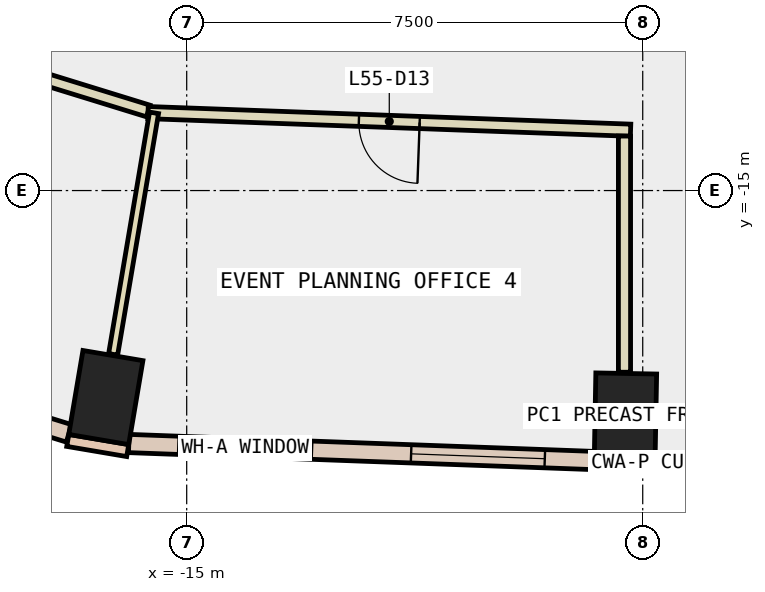
"""IFC4 building model, lengths in metres.
Left out: names, types, materials, properties, quantities, classifications, styles, units other than length and angle.
Written with IfcOpenShell. Run it as: python <this file> out.ifc"""

import sys

from ifc_helpers import new_model, si_unit, direction, frame, frame_2d, origin, origin_2d, place, context, subcontext, project, spatial, rectangle, extrude, element, fill, save


model = new_model("IFC4")
c1 = context("Model", 3, precision=1e-05, world=origin(), true_north=direction((0.0, 1.0)))
c2 = subcontext(c1, "Body", "Model", "MODEL_VIEW")
j1 = project(units=[si_unit("LENGTHUNIT", "METRE"), si_unit("PLANEANGLEUNIT", "RADIAN")], contexts=[c1])
p1 = place(None, origin())
s1 = spatial("IfcSite", under=j1, at=p1, CompositionType="ELEMENT")
p2 = place(p1, origin())
s2 = spatial("IfcBuilding", under=s1, at=p2, CompositionType="ELEMENT")
p3 = place(p2, frame((0.0, 0.0, 245.0)))
s3 = spatial("IfcBuildingStorey", under=s2, at=p3, CompositionType="ELEMENT", Elevation=245.0)
for number, where, z_axis, x_axis in (
    (1, (-16.33, -18.404, -0.34), (0.0, 0.0, 1.0), (-0.986, 0.167, 0.0)),
    (2, (-7.784, -18.708, -0.34), (0.0, 0.0, 1.0), (-1.0, 0.018, 0.0)),
):
    element("IfcColumn", number, at=place(p3, frame(where, z_axis=z_axis, x_axis=x_axis)), inside=s3, PredefinedType="COLUMN", context=c2, shape_type="SweptSolid", body=[
        extrude(rectangle(XDim=1.0, YDim=1.4, at=origin_2d()), origin(), (0.0, 0.0, 1.0), 3.6),
    ])
for number, where, z_axis, x_axis in (
    (3, (-16.956, -19.109, 0.0), (0.0, 0.0, 1.0), (0.986, -0.167, 0.0)),
    (4, (-8.298, -19.499, 0.0), (0.0, 0.0, 1.0), (1.0, -0.018, 0.0)),
):
    element("IfcWall", number, at=place(p3, frame(where, z_axis=z_axis, x_axis=x_axis)), inside=s3, PredefinedType="STANDARD", context=c2, shape_type="SweptSolid", body=[
        extrude(rectangle(XDim=1.0, YDim=0.2, at=frame_2d((0.5, 0.0))), origin(), (0.0, 0.0, 1.0), 3.26),
    ])
p4 = place(p3, frame((-15.952, -19.16, 0.0), z_axis=(0.0, 0.0, 1.0), x_axis=(0.999331753125, -0.036551979363, 0.0)))
e5 = element("IfcWall", 5, at=p4, inside=s3, PredefinedType="STANDARD", context=c2, shape_type="SweptSolid", body=[
    extrude(rectangle(XDim=7.661, YDim=0.3, at=frame_2d((3.831, 0.0))), origin(), (0.0, 0.0, 1.0), 3.26),
])
p5 = place(p4, frame((0.815, 0.0, 0.9)))
e6 = element("IfcOpeningElement", 6, at=p5, cuts=e5, PredefinedType="OPENING", context=c2, shape_type="SweptSolid", body=[
    extrude(rectangle(XDim=2.2, YDim=2.0, at=frame_2d((1.1, 1.0))), frame((0.0, 0.16, 0.0), z_axis=(0.0, -1.0, 0.0), x_axis=(1.0, 0.0, 0.0)), (0.0, 0.0, 1.0), 0.32),
])
p6 = place(p4, frame((4.646, 0.0, 0.9)))
e7 = element("IfcOpeningElement", 7, at=p6, cuts=e5, PredefinedType="OPENING", context=c2, shape_type="SweptSolid", body=[
    extrude(rectangle(XDim=2.2, YDim=2.0, at=frame_2d((1.1, 1.0))), frame((0.0, 0.16, 0.0), z_axis=(0.0, -1.0, 0.0), x_axis=(1.0, 0.0, 0.0)), (0.0, 0.0, 1.0), 0.32),
])
p7 = place(p3, frame((-20.661, -17.845, 0.0), z_axis=(0.0, 0.0, 1.0), x_axis=(0.955646189569, -0.2945171648, 0.0)))
e8 = element("IfcWall", 8, at=p7, inside=s3, PredefinedType="STANDARD", context=c2, shape_type="SweptSolid", body=[
    extrude(rectangle(XDim=3.898, YDim=0.3, at=frame_2d((1.949, 0.0))), origin(), (0.0, 0.0, 1.0), 3.26),
])
p8 = place(p7, frame((1.249, 0.0, 0.9)))
e9 = element("IfcOpeningElement", 9, at=p8, cuts=e8, PredefinedType="OPENING", context=c2, shape_type="SweptSolid", body=[
    extrude(rectangle(XDim=1.4, YDim=2.0, at=frame_2d((0.7, 1.0))), frame((0.0, 0.16, 0.0), z_axis=(0.0, -1.0, 0.0), x_axis=(1.0, 0.0, 0.0)), (0.0, 0.0, 1.0), 0.32),
])
p9 = place(p3, frame((-15.632, -13.692, 0.0), z_axis=(0.0, 0.0, 1.0), x_axis=(-0.955600342663, 0.294665887239, 0.0)))
e10 = element("IfcWall", 10, at=p9, inside=s3, PredefinedType="PARTITIONING", context=c2, shape_type="SweptSolid", body=[
    extrude(rectangle(XDim=2.81, YDim=0.2, at=frame_2d((1.405, 0.0))), origin(), (0.0, 0.0, 1.0), 3.26),
])
p10 = place(p3, frame((-7.7, -14.008, 0.0), z_axis=(0.0, 0.0, 1.0), x_axis=(-0.99933282306, 0.036522715615, 0.0)))
e11 = element("IfcWall", 11, at=p10, inside=s3, PredefinedType="PARTITIONING", context=c2, shape_type="SweptSolid", body=[
    extrude(rectangle(XDim=7.941, YDim=0.2, at=frame_2d((3.971, 0.0))), origin(), (0.0, 0.0, 1.0), 3.26),
])
p11 = place(p10, frame((3.471, 0.0, 0.0)))
e12 = element("IfcOpeningElement", 12, at=p11, cuts=e11, PredefinedType="OPENING", context=c2, shape_type="SweptSolid", body=[
    extrude(rectangle(XDim=1.0, YDim=2.1, at=frame_2d((0.5, 1.05))), frame((0.0, 0.11, 0.0), z_axis=(0.0, -1.0, 0.0), x_axis=(1.0, 0.0, 0.0)), (0.0, 0.0, 1.0), 0.22),
])
p12 = place(p3, frame((-7.8, -17.988, 0.0), z_axis=(0.0, 0.0, 1.0), x_axis=(0.0, 1.0, 0.0)))
e13 = element("IfcWall", 13, at=p12, inside=s3, PredefinedType="PARTITIONING", context=c2, shape_type="SweptSolid", body=[
    extrude(rectangle(XDim=3.884, YDim=0.2, at=frame_2d((1.942, 0.0))), origin(), (0.0, 0.0, 1.0), 3.26),
])
p13 = place(p3, frame((-15.537, -13.722, 0.0), z_axis=(0.0, 0.0, 1.0), x_axis=(-0.167012380144, -0.985954798598, 0.0)))
e14 = element("IfcWall", 14, at=p13, inside=s3, PredefinedType="PARTITIONING", context=c2, shape_type="SweptSolid", body=[
    extrude(rectangle(XDim=4.029, YDim=0.15, at=frame_2d((2.014, 0.0))), origin(), (0.0, 0.0, 1.0), 3.26),
])
p14 = place(p5, origin())
e15 = element("IfcWindow", 15, at=p14, inside=s3, PartitioningType="SINGLE_PANEL", PredefinedType="WINDOW", context=c2, shape_type="SweptSolid", body=[
    extrude(rectangle(XDim=2.2, YDim=2.0, at=frame_2d((1.1, 1.0))), frame((0.0, 0.03, 0.0), z_axis=(0.0, -1.0, 0.0), x_axis=(1.0, 0.0, 0.0)), (0.0, 0.0, 1.0), 0.06),
])
fill(e6, e15)
p15 = place(p6, origin())
e16 = element("IfcWindow", 16, at=p15, inside=s3, PartitioningType="SINGLE_PANEL", PredefinedType="WINDOW", context=c2, shape_type="SweptSolid", body=[
    extrude(rectangle(XDim=2.2, YDim=2.0, at=frame_2d((1.1, 1.0))), frame((0.0, 0.03, 0.0), z_axis=(0.0, -1.0, 0.0), x_axis=(1.0, 0.0, 0.0)), (0.0, 0.0, 1.0), 0.06),
])
fill(e7, e16)
p16 = place(p11, origin())
e17 = element("IfcDoor", 17, at=p16, inside=s3, OperationType="SINGLE_SWING_RIGHT", PredefinedType="DOOR", context=c2, shape_type="SweptSolid", body=[
    extrude(rectangle(XDim=1.0, YDim=2.1, at=frame_2d((0.5, 1.05))), frame((0.0, 0.025, 0.0), z_axis=(0.0, -1.0, 0.0), x_axis=(1.0, 0.0, 0.0)), (0.0, 0.0, 1.0), 0.05),
])
fill(e12, e17)
save(model, sys.argv[1])
